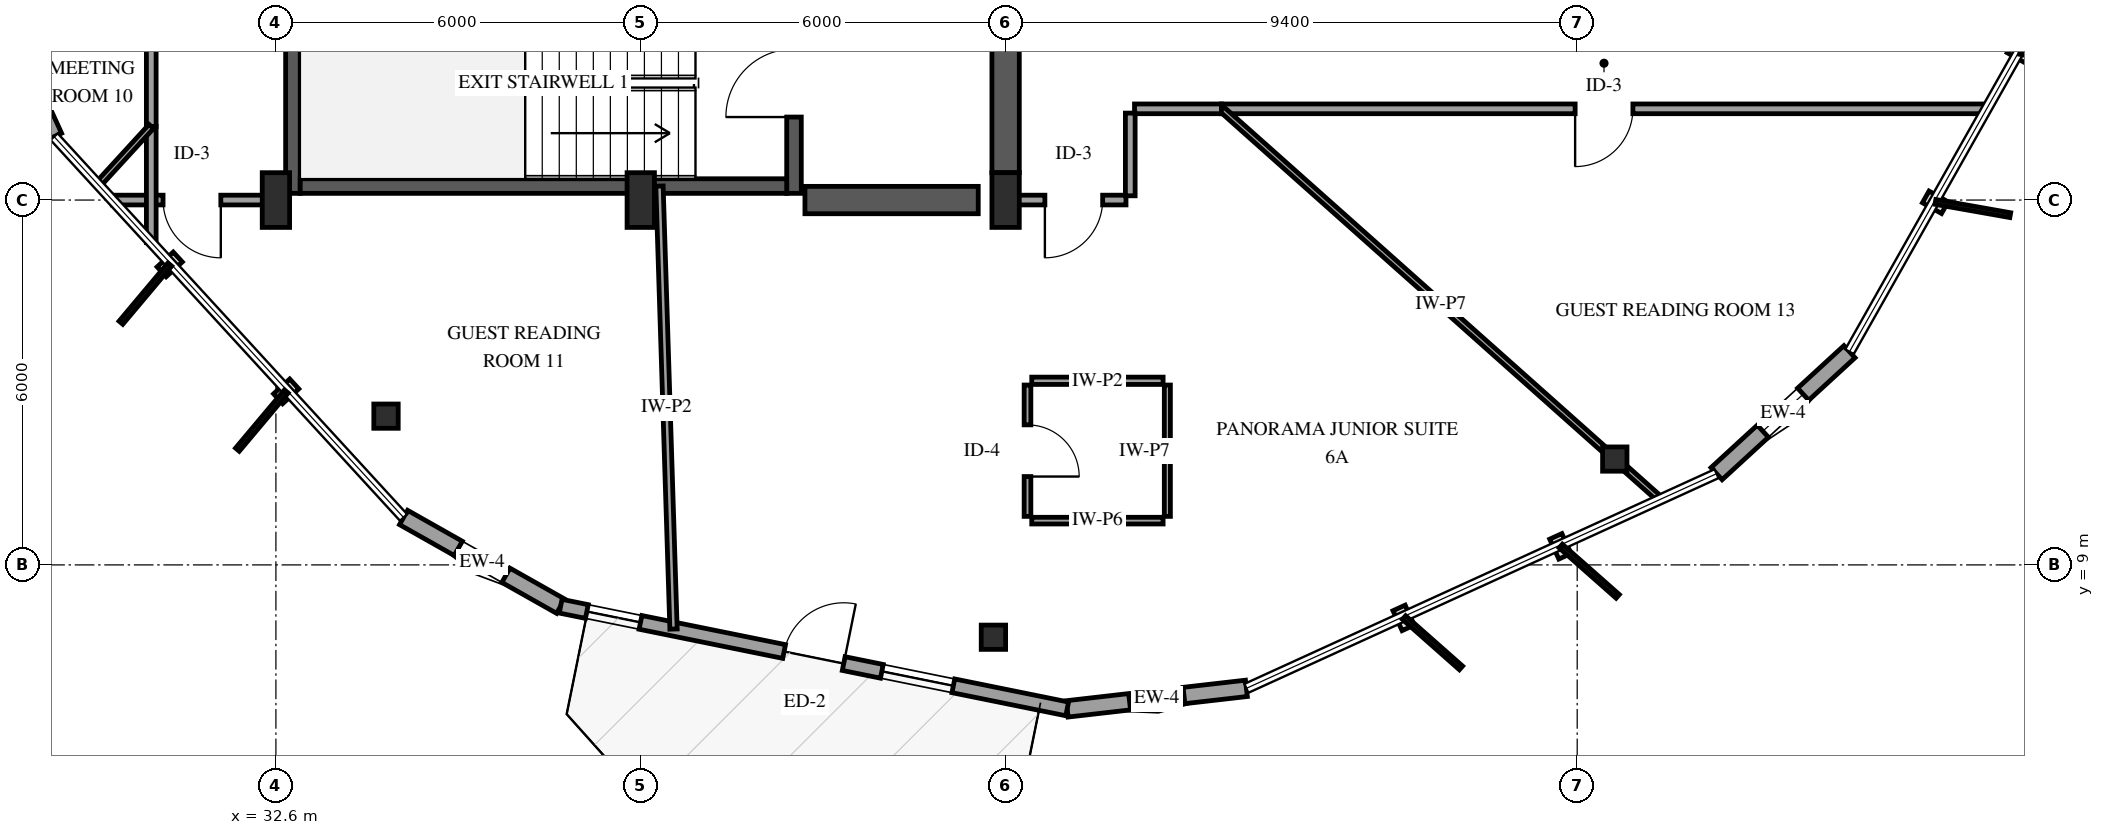
"""IFC4 building model, lengths in metres.
Left out: names, types, materials, properties, quantities, classifications, styles, units other than length and angle.
Written with IfcOpenShell. Run it as: python <this file> out.ifc"""

import sys

from ifc_helpers import new_model, si_unit, direction, frame, frame_2d, origin, origin_2d, place, context, subcontext, project, spatial, rectangle, i_section, extrude, element, fill, save


model = new_model("IFC4")
c1 = context("Model", 3, precision=1e-05, world=origin(), true_north=direction((0.0, 1.0)))
c2 = subcontext(c1, "Body", "Model", "MODEL_VIEW")
j1 = project(units=[si_unit("LENGTHUNIT", "METRE"), si_unit("PLANEANGLEUNIT", "RADIAN")], contexts=[c1])
p1 = place(None, origin())
s1 = spatial("IfcSite", under=j1, at=p1, CompositionType="ELEMENT")
p2 = place(p1, origin())
s2 = spatial("IfcBuilding", under=s1, at=p2, CompositionType="ELEMENT")
p3 = place(p2, frame((0.0, 0.0, 261.25)))
s3 = spatial("IfcBuildingStorey", under=s2, at=p3, CompositionType="ELEMENT", Elevation=261.25)
p4 = place(p3, frame((32.88, 15.11, 0.0), z_axis=(0.0, 0.0, 1.0), x_axis=(0.0, 1.0, 0.0)))
e1 = element("IfcWall", 1, at=p4, inside=s3, PredefinedType="SHEAR", context=c2, shape_type="SweptSolid", body=[
    extrude(rectangle(XDim=3.63, YDim=0.24, at=frame_2d((1.815, 0.0))), origin(), (0.0, 0.0, 1.0), 3.75),
])
p5 = place(p3, frame((41.12, 15.11, 0.0), z_axis=(0.0, 0.0, 1.0), x_axis=(0.0, 1.0, 0.0)))
e2 = element("IfcWall", 2, at=p5, inside=s3, PredefinedType="SHEAR", context=c2, shape_type="SweptSolid", body=[
    extrude(rectangle(XDim=3.63, YDim=0.24, at=frame_2d((1.815, 0.0))), origin(), (0.0, 0.0, 1.0), 3.75),
])
p6 = place(p5, frame((1.255, 0.0, 0.0)))
e3 = element("IfcOpeningElement", 3, at=p6, cuts=e2, PredefinedType="OPENING", context=c2, shape_type="SweptSolid", body=[
    extrude(rectangle(XDim=1.12, YDim=2.15, at=frame_2d((0.56, 1.075))), frame((0.0, 0.13, 0.0), z_axis=(0.0, -1.0, 0.0), x_axis=(1.0, 0.0, 0.0)), (0.0, 0.0, 1.0), 0.26),
])
p7 = place(p3, frame((33.0, 15.23, 0.0), z_axis=(0.0, 0.0, 1.0), x_axis=(1.0, 0.0, 0.0)))
e4 = element("IfcWall", 4, at=p7, inside=s3, PredefinedType="SHEAR", context=c2, shape_type="SweptSolid", body=[
    extrude(rectangle(XDim=8.0, YDim=0.24, at=frame_2d((4.0, 0.0))), origin(), (0.0, 0.0, 1.0), 3.75),
])
p8 = place(p3, frame((41.3, 15.0, 0.0), z_axis=(0.0, 0.0, 1.0), x_axis=(1.0, 0.0, 0.0)))
e5 = element("IfcWall", 5, at=p8, inside=s3, PredefinedType="SHEAR", context=c2, shape_type="SweptSolid", body=[
    extrude(rectangle(XDim=2.85, YDim=0.45, at=frame_2d((1.425, 0.0))), origin(), (0.0, 0.0, 1.0), 3.75),
])
p9 = place(p3, frame((44.6, 15.45, 0.0), z_axis=(0.0, 0.0, 1.0), x_axis=(0.0, 1.0, 0.0)))
e6 = element("IfcWall", 6, at=p9, inside=s3, PredefinedType="SHEAR", context=c2, shape_type="SweptSolid", body=[
    extrude(rectangle(XDim=6.35, YDim=0.45, at=frame_2d((3.175, 0.0))), origin(), (0.0, 0.0, 1.0), 3.75),
])
for number, where, z_axis, x_axis in (
    (7, (32.6, 15.0, 0.0), (0.0, 0.0, 1.0), (1.0, 0.0, 0.0)),
    (8, (38.6, 15.0, 0.0), (0.0, 0.0, 1.0), (1.0, 0.0, 0.0)),
    (9, (44.6, 15.0, 0.0), (0.0, 0.0, 1.0), (1.0, 0.0, 0.0)),
):
    element("IfcColumn", number, at=place(p3, frame(where, z_axis=z_axis, x_axis=x_axis)), inside=s3, PredefinedType="PILASTER", context=c2, shape_type="SweptSolid", body=[
        extrude(rectangle(XDim=0.45, YDim=0.9, at=origin_2d()), origin(), (0.0, 0.0, 1.0), 3.75),
    ])
for number, where, z_axis, x_axis in (
    (10, (34.411, 11.446, 0.0), (0.0, 0.0, 1.0), (1.0, 0.0, 0.0)),
    (11, (44.4, 7.811, 0.0), (0.0, 0.0, 1.0), (1.0, 0.0, 0.0)),
    (12, (54.618, 10.74, 0.0), (0.0, 0.0, 1.0), (1.0, 0.0, 0.0)),
):
    element("IfcColumn", number, at=place(p3, frame(where, z_axis=z_axis, x_axis=x_axis)), inside=s3, PredefinedType="COLUMN", context=c2, shape_type="SweptSolid", body=[
        extrude(i_section(OverallWidth=0.401, OverallDepth=0.399, WebThickness=0.025, FlangeThickness=0.04, FilletRadius=0.038, at=origin_2d()), origin(), (0.0, 0.0, 1.0), 3.75),
    ])
p10 = place(p3, frame((27.72, 18.741, 0.0), z_axis=(0.0, 0.0, 1.0), x_axis=(0.415364895304, -0.909654881672, 0.0)))
e13 = element("IfcWall", 13, at=p10, inside=s3, PredefinedType="SOLIDWALL", context=c2, shape_type="SweptSolid", body=[
    extrude(rectangle(XDim=2.967, YDim=0.27, at=frame_2d((1.483, 0.0))), origin(), (0.0, 0.0, 1.0), 2.829),
])
p11 = place(p10, frame((1.033, 0.0, 0.75)))
e14 = element("IfcOpeningElement", 14, at=p11, cuts=e13, PredefinedType="OPENING", context=c2, shape_type="SweptSolid", body=[
    extrude(rectangle(XDim=0.9, YDim=1.5, at=frame_2d((0.45, 0.75))), frame((0.0, 0.145, 0.0), z_axis=(0.0, -1.0, 0.0), x_axis=(1.0, 0.0, 0.0)), (0.0, 0.0, 1.0), 0.29),
])
p12 = place(p3, frame((34.699, 9.78, 0.0), z_axis=(0.0, 0.0, 1.0), x_axis=(0.870703816421, -0.491807751128, 0.0)))
e15 = element("IfcWall", 15, at=p12, inside=s3, PredefinedType="SOLIDWALL", context=c2, shape_type="SweptSolid", body=[
    extrude(rectangle(XDim=2.967, YDim=0.27, at=frame_2d((1.483, 0.0))), origin(), (0.0, 0.0, 1.0), 2.829),
])
p13 = place(p12, frame((1.033, 0.0, 0.75)))
e16 = element("IfcOpeningElement", 16, at=p13, cuts=e15, PredefinedType="OPENING", context=c2, shape_type="SweptSolid", body=[
    extrude(rectangle(XDim=0.9, YDim=1.5, at=frame_2d((0.45, 0.75))), frame((0.0, 0.145, 0.0), z_axis=(0.0, -1.0, 0.0), x_axis=(1.0, 0.0, 0.0)), (0.0, 0.0, 1.0), 0.29),
])
p14 = place(p3, frame((45.613, 6.632, 0.0), z_axis=(0.0, 0.0, 1.0), x_axis=(0.993482974501, 0.113980609649, 0.0)))
e17 = element("IfcWall", 17, at=p14, inside=s3, PredefinedType="SOLIDWALL", context=c2, shape_type="SweptSolid", body=[
    extrude(rectangle(XDim=2.967, YDim=0.27, at=frame_2d((1.483, 0.0))), origin(), (0.0, 0.0, 1.0), 2.829),
])
p15 = place(p14, frame((1.033, 0.0, 0.75)))
e18 = element("IfcOpeningElement", 18, at=p15, cuts=e17, PredefinedType="OPENING", context=c2, shape_type="SweptSolid", body=[
    extrude(rectangle(XDim=0.9, YDim=1.5, at=frame_2d((0.45, 0.75))), frame((0.0, 0.145, 0.0), z_axis=(0.0, -1.0, 0.0), x_axis=(1.0, 0.0, 0.0)), (0.0, 0.0, 1.0), 0.29),
])
p16 = place(p3, frame((37.282, 8.321, 0.0), z_axis=(0.0, 0.0, 1.0), x_axis=(0.980059134028, -0.198706048744, 0.0)))
e19 = element("IfcWall", 19, at=p16, inside=s3, PredefinedType="SOLIDWALL", context=c2, shape_type="SweptSolid", body=[
    extrude(rectangle(XDim=8.5, YDim=0.23, at=frame_2d((4.25, 0.0))), origin(), (0.0, 0.0, 1.0), 2.829),
])
p17 = place(p16, frame((3.75, 0.0, 0.0)))
e20 = element("IfcOpeningElement", 20, at=p17, cuts=e19, PredefinedType="OPENING", context=c2, shape_type="SweptSolid", body=[
    extrude(rectangle(XDim=1.0, YDim=2.15, at=frame_2d((0.5, 1.075))), frame((0.0, 0.125, 0.0), z_axis=(0.0, -1.0, 0.0), x_axis=(1.0, 0.0, 0.0)), (0.0, 0.0, 1.0), 0.25),
])
p18 = place(p16, frame((0.44, 0.0, 0.72)))
e21 = element("IfcOpeningElement", 21, at=p18, cuts=e19, PredefinedType="OPENING", context=c2, shape_type="SweptSolid", body=[
    extrude(rectangle(XDim=0.9, YDim=1.5, at=frame_2d((0.45, 0.75))), frame((0.0, 0.125, 0.0), z_axis=(0.0, -1.0, 0.0), x_axis=(1.0, 0.0, 0.0)), (0.0, 0.0, 1.0), 0.25),
])
p19 = place(p16, frame((5.39, 0.0, 0.72)))
e22 = element("IfcOpeningElement", 22, at=p19, cuts=e19, PredefinedType="OPENING", context=c2, shape_type="SweptSolid", body=[
    extrude(rectangle(XDim=1.2, YDim=1.6, at=frame_2d((0.6, 0.8))), frame((0.0, 0.125, 0.0), z_axis=(0.0, -1.0, 0.0), x_axis=(1.0, 0.0, 0.0)), (0.0, 0.0, 1.0), 0.25),
])
p20 = place(p3, frame((56.292, 10.5, 0.0), z_axis=(0.0, 0.0, 1.0), x_axis=(0.736781684987, 0.676130718625, 0.0)))
e23 = element("IfcWall", 23, at=p20, inside=s3, PredefinedType="SOLIDWALL", context=c2, shape_type="SweptSolid", body=[
    extrude(rectangle(XDim=2.967, YDim=0.27, at=frame_2d((1.483, 0.0))), origin(), (0.0, 0.0, 1.0), 2.829),
])
p21 = place(p20, frame((1.033, 0.0, 0.75)))
e24 = element("IfcOpeningElement", 24, at=p21, cuts=e23, PredefinedType="OPENING", context=c2, shape_type="SweptSolid", body=[
    extrude(rectangle(XDim=0.9, YDim=1.5, at=frame_2d((0.45, 0.75))), frame((0.0, 0.145, 0.0), z_axis=(0.0, -1.0, 0.0), x_axis=(1.0, 0.0, 0.0)), (0.0, 0.0, 1.0), 0.29),
])
p22 = place(p3, frame((60.734, 16.5, 0.0), z_axis=(0.0, 0.0, 1.0), x_axis=(-1.0, 0.0, 0.0)))
e25 = element("IfcWall", 25, at=p22, inside=s3, PredefinedType="PARTITIONING", context=c2, shape_type="SweptSolid", body=[
    extrude(rectangle(XDim=12.585, YDim=0.16, at=frame_2d((6.292, 0.0))), origin(), (0.0, 0.0, 1.0), 3.45),
])
p23 = place(p22, frame((5.818, 0.0, 0.0)))
e26 = element("IfcOpeningElement", 26, at=p23, cuts=e25, PredefinedType="OPENING", context=c2, shape_type="SweptSolid", body=[
    extrude(rectangle(XDim=0.95, YDim=2.15, at=frame_2d((0.475, 1.075))), frame((0.0, 0.09, 0.0), z_axis=(0.0, -1.0, 0.0), x_axis=(1.0, 0.0, 0.0)), (0.0, 0.0, 1.0), 0.18),
])
p24 = place(p3, frame((48.149, 16.5, 0.0), z_axis=(0.0, 0.0, 1.0), x_axis=(0.746911305698, -0.664923680899, 0.0)))
e27 = element("IfcWall", 27, at=p24, inside=s3, PredefinedType="PARTITIONING", context=c2, shape_type="SweptSolid", body=[
    extrude(rectangle(XDim=9.66, YDim=0.1, at=frame_2d((4.83, 0.0))), origin(), (0.0, 0.0, 1.0), 2.828),
])
p25 = place(p3, frame((38.908, 15.23, 0.0), z_axis=(0.0, 0.0, 1.0), x_axis=(0.031687554573, -0.999497823352, 0.0)))
e28 = element("IfcWall", 28, at=p25, inside=s3, PredefinedType="PARTITIONING", context=c2, shape_type="SweptSolid", body=[
    extrude(rectangle(XDim=7.289, YDim=0.12, at=frame_2d((3.644, 0.0))), origin(), (0.0, 0.0, 1.0), 2.828),
])
p26 = place(p3, frame((30.55, 16.21, 0.0), z_axis=(0.0, 0.0, 1.0), x_axis=(0.0, 1.0, 0.0)))
e29 = element("IfcWall", 29, at=p26, inside=s3, PredefinedType="PARTITIONING", context=c2, shape_type="SweptSolid", body=[
    extrude(rectangle(XDim=5.024, YDim=0.16, at=frame_2d((2.512, 0.0))), origin(), (0.0, 0.0, 1.0), 3.45),
])
p27 = place(p26, frame((2.037, 0.0, 0.0)))
e30 = element("IfcOpeningElement", 30, at=p27, cuts=e29, PredefinedType="OPENING", context=c2, shape_type="SweptSolid", body=[
    extrude(rectangle(XDim=0.95, YDim=2.15, at=frame_2d((0.475, 1.075))), frame((0.0, 0.09, 0.0), z_axis=(0.0, -1.0, 0.0), x_axis=(1.0, 0.0, 0.0)), (0.0, 0.0, 1.0), 0.18),
])
p28 = place(p3, frame((32.53, 15.0, 0.0), z_axis=(0.0, 0.0, 1.0), x_axis=(-1.0, 0.0, 0.0)))
e31 = element("IfcWall", 31, at=p28, inside=s3, PredefinedType="PARTITIONING", context=c2, shape_type="SweptSolid", body=[
    extrude(rectangle(XDim=2.621, YDim=0.16, at=frame_2d((1.311, 0.0))), origin(), (0.0, 0.0, 1.0), 3.45),
])
p29 = place(p28, frame((0.836, 0.0, 0.0)))
e32 = element("IfcOpeningElement", 32, at=p29, cuts=e31, PredefinedType="OPENING", context=c2, shape_type="SweptSolid", body=[
    extrude(rectangle(XDim=0.95, YDim=2.15, at=frame_2d((0.475, 1.075))), frame((0.0, 0.09, 0.0), z_axis=(0.0, -1.0, 0.0), x_axis=(1.0, 0.0, 0.0)), (0.0, 0.0, 1.0), 0.18),
])
p30 = place(p3, frame((44.96, 11.958, 0.0), z_axis=(0.0, 0.0, 1.0), x_axis=(0.0, -1.0, 0.0)))
e33 = element("IfcWall", 33, at=p30, inside=s3, PredefinedType="PARTITIONING", context=c2, shape_type="SweptSolid", body=[
    extrude(rectangle(XDim=2.16, YDim=0.11, at=frame_2d((1.08, 0.0))), origin(), (0.0, 0.0, 1.0), 2.828),
])
p31 = place(p30, frame((0.655, 0.0, 0.0)))
e34 = element("IfcOpeningElement", 34, at=p31, cuts=e33, PredefinedType="OPENING", context=c2, shape_type="SweptSolid", body=[
    extrude(rectangle(XDim=0.85, YDim=2.1, at=frame_2d((0.425, 1.05))), frame((0.0, 0.065, 0.0), z_axis=(0.0, -1.0, 0.0), x_axis=(1.0, 0.0, 0.0)), (0.0, 0.0, 1.0), 0.13),
])
p32 = place(p3, frame((47.26, 9.798, 0.0), z_axis=(0.0, 0.0, 1.0), x_axis=(0.0, 1.0, 0.0)))
e35 = element("IfcWall", 35, at=p32, inside=s3, PredefinedType="PARTITIONING", context=c2, shape_type="SweptSolid", body=[
    extrude(rectangle(XDim=2.16, YDim=0.1, at=frame_2d((1.08, 0.0))), origin(), (0.0, 0.0, 1.0), 3.45),
])
p33 = place(p3, frame((47.19, 12.028, 0.0), z_axis=(0.0, 0.0, 1.0), x_axis=(-1.0, 0.0, 0.0)))
e36 = element("IfcWall", 36, at=p33, inside=s3, PredefinedType="PARTITIONING", context=c2, shape_type="SweptSolid", body=[
    extrude(rectangle(XDim=2.16, YDim=0.12, at=frame_2d((1.08, 0.0))), origin(), (0.0, 0.0, 1.0), 3.45),
])
p34 = place(p3, frame((45.03, 9.728, 0.0), z_axis=(0.0, 0.0, 1.0), x_axis=(1.0, 0.0, 0.0)))
e37 = element("IfcWall", 37, at=p34, inside=s3, PredefinedType="PARTITIONING", context=c2, shape_type="SweptSolid", body=[
    extrude(rectangle(XDim=2.16, YDim=0.11, at=frame_2d((1.08, 0.0))), origin(), (0.0, 0.0, 1.0), 3.45),
])
p35 = place(p3, frame((46.58, 15.0, 0.0), z_axis=(0.0, 0.0, 1.0), x_axis=(-1.0, 0.0, 0.0)))
e38 = element("IfcWall", 38, at=p35, inside=s3, PredefinedType="PARTITIONING", context=c2, shape_type="SweptSolid", body=[
    extrude(rectangle(XDim=1.91, YDim=0.16, at=frame_2d((0.955, 0.0))), origin(), (0.0, 0.0, 1.0), 3.45),
])
p36 = place(p35, frame((0.384, 0.0, 0.0)))
e39 = element("IfcOpeningElement", 39, at=p36, cuts=e38, PredefinedType="OPENING", context=c2, shape_type="SweptSolid", body=[
    extrude(rectangle(XDim=0.95, YDim=2.15, at=frame_2d((0.475, 1.075))), frame((0.0, 0.09, 0.0), z_axis=(0.0, -1.0, 0.0), x_axis=(1.0, 0.0, 0.0)), (0.0, 0.0, 1.0), 0.18),
])
p37 = place(p3, frame((30.55, 14.302, 0.0), z_axis=(0.0, 0.0, 1.0), x_axis=(0.0, 1.0, 0.0)))
e40 = element("IfcWall", 40, at=p37, inside=s3, PredefinedType="PARTITIONING", context=c2, shape_type="SweptSolid", body=[
    extrude(rectangle(XDim=1.908, YDim=0.16, at=frame_2d((0.954, 0.0))), origin(), (0.0, 0.0, 1.0), 3.45),
])
p38 = place(p3, frame((48.149, 16.5, 0.0), z_axis=(0.0, 0.0, 1.0), x_axis=(-1.0, 0.0, 0.0)))
e41 = element("IfcWall", 41, at=p38, inside=s3, PredefinedType="PARTITIONING", context=c2, shape_type="SweptSolid", body=[
    extrude(rectangle(XDim=1.429, YDim=0.16, at=frame_2d((0.714, 0.0))), origin(), (0.0, 0.0, 1.0), 3.45),
])
p39 = place(p3, frame((46.65, 16.43, 0.0), z_axis=(0.0, 0.0, 1.0), x_axis=(0.0, -1.0, 0.0)))
e42 = element("IfcWall", 42, at=p39, inside=s3, PredefinedType="PARTITIONING", context=c2, shape_type="SweptSolid", body=[
    extrude(rectangle(XDim=1.36, YDim=0.16, at=frame_2d((0.68, 0.0))), origin(), (0.0, 0.0, 1.0), 3.45),
])
p40 = place(p3, frame((30.55, 16.21, 0.0), z_axis=(0.0, 0.0, 1.0), x_axis=(-0.67551976153, -0.737341882563, 0.0)))
e43 = element("IfcWall", 43, at=p40, inside=s3, PredefinedType="PARTITIONING", context=c2, shape_type="SweptSolid", body=[
    extrude(rectangle(XDim=1.295, YDim=0.1, at=frame_2d((0.648, 0.0))), origin(), (0.0, 0.0, 1.0), 3.45),
])
p41 = place(p13, origin())
e44 = element("IfcWindow", 44, at=p41, inside=s3, PartitioningType="SINGLE_PANEL", PredefinedType="WINDOW", context=c2, shape_type="SweptSolid", body=[
    extrude(rectangle(XDim=0.9, YDim=1.5, at=frame_2d((0.45, 0.75))), frame((0.0, 0.03, 0.0), z_axis=(0.0, -1.0, 0.0), x_axis=(1.0, 0.0, 0.0)), (0.0, 0.0, 1.0), 0.06),
])
fill(e16, e44)
p42 = place(p15, origin())
e45 = element("IfcWindow", 45, at=p42, inside=s3, PartitioningType="SINGLE_PANEL", PredefinedType="WINDOW", context=c2, shape_type="SweptSolid", body=[
    extrude(rectangle(XDim=0.9, YDim=1.5, at=frame_2d((0.45, 0.75))), frame((0.0, 0.03, 0.0), z_axis=(0.0, -1.0, 0.0), x_axis=(1.0, 0.0, 0.0)), (0.0, 0.0, 1.0), 0.06),
])
fill(e18, e45)
p43 = place(p17, origin())
e46 = element("IfcDoor", 46, at=p43, inside=s3, OperationType="SINGLE_SWING_RIGHT", PredefinedType="DOOR", context=c2, shape_type="SweptSolid", body=[
    extrude(rectangle(XDim=1.0, YDim=2.15, at=frame_2d((0.5, 1.075))), frame((0.0, 0.025, 0.0), z_axis=(0.0, -1.0, 0.0), x_axis=(1.0, 0.0, 0.0)), (0.0, 0.0, 1.0), 0.05),
])
fill(e20, e46)
p44 = place(p18, origin())
e47 = element("IfcWindow", 47, at=p44, inside=s3, PartitioningType="SINGLE_PANEL", PredefinedType="WINDOW", context=c2, shape_type="SweptSolid", body=[
    extrude(rectangle(XDim=0.9, YDim=1.5, at=frame_2d((0.45, 0.75))), frame((0.0, 0.03, 0.0), z_axis=(0.0, -1.0, 0.0), x_axis=(1.0, 0.0, 0.0)), (0.0, 0.0, 1.0), 0.06),
])
fill(e21, e47)
p45 = place(p19, origin())
e48 = element("IfcWindow", 48, at=p45, inside=s3, PartitioningType="SINGLE_PANEL", PredefinedType="WINDOW", context=c2, shape_type="SweptSolid", body=[
    extrude(rectangle(XDim=1.2, YDim=1.6, at=frame_2d((0.6, 0.8))), frame((0.0, 0.03, 0.0), z_axis=(0.0, -1.0, 0.0), x_axis=(1.0, 0.0, 0.0)), (0.0, 0.0, 1.0), 0.06),
])
fill(e22, e48)
p46 = place(p21, origin())
e49 = element("IfcWindow", 49, at=p46, inside=s3, PartitioningType="SINGLE_PANEL", PredefinedType="WINDOW", context=c2, shape_type="SweptSolid", body=[
    extrude(rectangle(XDim=0.9, YDim=1.5, at=frame_2d((0.45, 0.75))), frame((0.0, 0.03, 0.0), z_axis=(0.0, -1.0, 0.0), x_axis=(1.0, 0.0, 0.0)), (0.0, 0.0, 1.0), 0.06),
])
fill(e24, e49)
p47 = place(p6, origin())
e50 = element("IfcDoor", 50, at=p47, inside=s3, OperationType="SINGLE_SWING_LEFT", PredefinedType="DOOR", context=c2, shape_type="SweptSolid", body=[
    extrude(rectangle(XDim=1.12, YDim=2.15, at=frame_2d((0.56, 1.075))), frame((0.0, 0.025, 0.0), z_axis=(0.0, -1.0, 0.0), x_axis=(1.0, 0.0, 0.0)), (0.0, 0.0, 1.0), 0.05),
])
fill(e3, e50)
p48 = place(p23, origin())
e51 = element("IfcDoor", 51, at=p48, inside=s3, OperationType="SINGLE_SWING_RIGHT", PredefinedType="DOOR", context=c2, shape_type="SweptSolid", body=[
    extrude(rectangle(XDim=0.95, YDim=2.15, at=frame_2d((0.475, 1.075))), frame((0.0, 0.025, 0.0), z_axis=(0.0, -1.0, 0.0), x_axis=(1.0, 0.0, 0.0)), (0.0, 0.0, 1.0), 0.05),
])
fill(e26, e51)
p49 = place(p29, origin())
e52 = element("IfcDoor", 52, at=p49, inside=s3, OperationType="SINGLE_SWING_LEFT", PredefinedType="DOOR", context=c2, shape_type="SweptSolid", body=[
    extrude(rectangle(XDim=0.95, YDim=2.15, at=frame_2d((0.475, 1.075))), frame((0.0, 0.025, 0.0), z_axis=(0.0, -1.0, 0.0), x_axis=(1.0, 0.0, 0.0)), (0.0, 0.0, 1.0), 0.05),
])
fill(e32, e52)
p50 = place(p31, origin())
e53 = element("IfcDoor", 53, at=p50, inside=s3, OperationType="SINGLE_SWING_RIGHT", PredefinedType="DOOR", context=c2, shape_type="SweptSolid", body=[
    extrude(rectangle(XDim=0.85, YDim=2.1, at=frame_2d((0.425, 1.05))), frame((0.0, 0.025, 0.0), z_axis=(0.0, -1.0, 0.0), x_axis=(1.0, 0.0, 0.0)), (0.0, 0.0, 1.0), 0.05),
])
fill(e34, e53)
p51 = place(p36, origin())
e54 = element("IfcDoor", 54, at=p51, inside=s3, OperationType="SINGLE_SWING_RIGHT", PredefinedType="DOOR", context=c2, shape_type="SweptSolid", body=[
    extrude(rectangle(XDim=0.95, YDim=2.15, at=frame_2d((0.475, 1.075))), frame((0.0, 0.025, 0.0), z_axis=(0.0, -1.0, 0.0), x_axis=(1.0, 0.0, 0.0)), (0.0, 0.0, 1.0), 0.05),
])
fill(e39, e54)
save(model, sys.argv[1])
